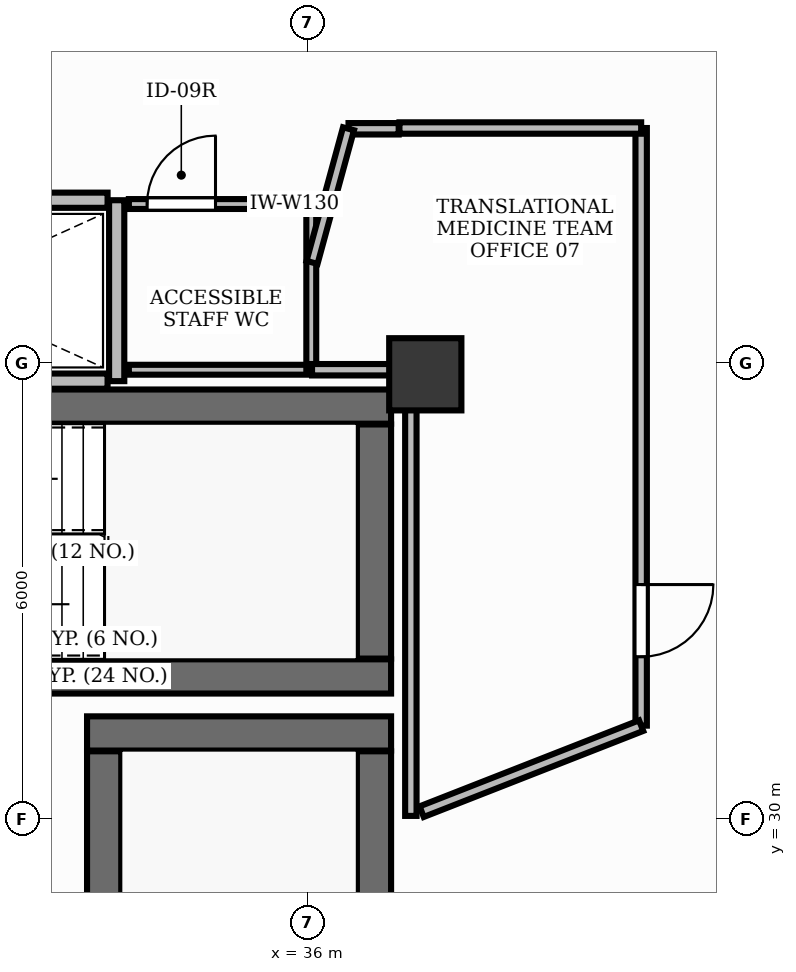
"""IFC4 building model, lengths in metres.
Left out: names, types, materials, properties, quantities, classifications, styles, units other than length and angle.
Written with IfcOpenShell. Run it as: python <this file> out.ifc"""

import sys

from ifc_helpers import new_model, si_unit, direction, frame, frame_2d, origin, origin_2d, place, context, subcontext, project, spatial, rectangle, extrude, element, fill, save


model = new_model("IFC4")
c1 = context("Model", 3, precision=1e-05, world=origin(), true_north=direction((0.0, 1.0)))
c2 = subcontext(c1, "Body", "Model", "MODEL_VIEW")
j1 = project(units=[si_unit("LENGTHUNIT", "METRE"), si_unit("PLANEANGLEUNIT", "RADIAN")], contexts=[c1])
p1 = place(None, origin())
s1 = spatial("IfcSite", under=j1, at=p1, CompositionType="ELEMENT")
p2 = place(p1, origin())
s2 = spatial("IfcBuilding", under=s1, at=p2, CompositionType="ELEMENT")
p3 = place(p2, frame((0.0, 0.0, 119.4)))
s3 = spatial("IfcBuildingStorey", under=s2, at=p3, CompositionType="ELEMENT", Elevation=119.4)
p4 = place(p3, frame((28.852, 35.425, 0.0), z_axis=(0.0, 0.0, 1.0), x_axis=(1.0, 0.0, 0.0)))
e1 = element("IfcWall", 1, at=p4, inside=s3, PredefinedType="SHEAR", context=c2, shape_type="SweptSolid", body=[
    extrude(rectangle(XDim=8.248, YDim=0.45, at=frame_2d((4.124, 0.0))), origin(), (0.0, 0.0, 1.0), 3.9),
])
p5 = place(p3, frame((28.35, 31.875, 0.0), z_axis=(0.0, 0.0, 1.0), x_axis=(1.0, 0.0, 0.0)))
e2 = element("IfcWall", 2, at=p5, inside=s3, PredefinedType="SHEAR", context=c2, shape_type="SweptSolid", body=[
    extrude(rectangle(XDim=8.75, YDim=0.45, at=frame_2d((4.375, 0.0))), origin(), (0.0, 0.0, 1.0), 3.9),
])
p6 = place(p3, frame((36.875, 32.11, 0.0), z_axis=(0.0, 0.0, 1.0), x_axis=(0.0, 1.0, 0.0)))
e3 = element("IfcWall", 3, at=p6, inside=s3, PredefinedType="SHEAR", context=c2, shape_type="SweptSolid", body=[
    extrude(rectangle(XDim=3.08, YDim=0.45, at=frame_2d((1.54, 0.0))), origin(), (0.0, 0.0, 1.0), 3.9),
])
p7 = place(p3, frame((33.1, 31.125, 0.0), z_axis=(0.0, 0.0, 1.0), x_axis=(1.0, 0.0, 0.0)))
e4 = element("IfcWall", 4, at=p7, inside=s3, PredefinedType="SHEAR", context=c2, shape_type="SweptSolid", body=[
    extrude(rectangle(XDim=4.0, YDim=0.45, at=frame_2d((2.0, 0.0))), origin(), (0.0, 0.0, 1.0), 3.9),
])
p8 = place(p3, frame((36.875, 23.11, 0.0), z_axis=(0.0, 0.0, 1.0), x_axis=(0.0, 1.0, 0.0)))
e5 = element("IfcWall", 5, at=p8, inside=s3, PredefinedType="SHEAR", context=c2, shape_type="SweptSolid", body=[
    extrude(rectangle(XDim=7.78, YDim=0.45, at=frame_2d((3.89, 0.0))), origin(), (0.0, 0.0, 1.0), 3.9),
])
p9 = place(p3, frame((33.325, 23.11, 0.0), z_axis=(0.0, 0.0, 1.0), x_axis=(0.0, 1.0, 0.0)))
e6 = element("IfcWall", 6, at=p9, inside=s3, PredefinedType="SHEAR", context=c2, shape_type="SweptSolid", body=[
    extrude(rectangle(XDim=7.78, YDim=0.45, at=frame_2d((3.89, 0.0))), origin(), (0.0, 0.0, 1.0), 3.9),
])
p10 = place(p9, frame((0.2, 0.0, 0.0)))
e7 = element("IfcOpeningElement", 7, at=p10, cuts=e6, PredefinedType="OPENING", context=c2, shape_type="SweptSolid", body=[
    extrude(rectangle(XDim=1.05, YDim=2.15, at=frame_2d((0.525, 1.075))), frame((0.0, 0.24, 0.0), z_axis=(0.0, -1.0, 0.0), x_axis=(1.0, 0.0, 0.0)), (0.0, 0.0, 1.0), 0.48),
])
p11 = place(p3, frame((37.55, 35.85, -0.0), z_axis=(0.0, 0.0, 1.0), x_axis=(1.0, 0.0, 0.0)))
e8 = element("IfcColumn", 8, at=p11, inside=s3, PredefinedType="PILASTER", context=c2, shape_type="SweptSolid", body=[
    extrude(rectangle(XDim=0.95, YDim=0.95, at=origin_2d()), origin(), (0.0, 0.0, 1.0), 3.901),
])
p12 = place(p3, frame((33.49, 35.76, 0.0), z_axis=(0.0, 0.0, 1.0), x_axis=(0.0, 1.0, 0.0)))
e9 = element("IfcWall", 9, at=p12, inside=s3, PredefinedType="PARTITIONING", context=c2, shape_type="SweptSolid", body=[
    extrude(rectangle(XDim=2.38, YDim=0.2, at=frame_2d((1.19, 0.0))), origin(), (0.0, 0.0, 1.0), 2.91),
])
for number, where, z_axis, x_axis in (
    (10, (28.8, 35.76, 0.0), (0.0, 0.0, 1.0), (1.0, 0.0, 0.0)),
    (11, (28.8, 38.14, 0.0), (0.0, 0.0, 1.0), (1.0, 0.0, 0.0)),
):
    element("IfcWall", number, at=place(p3, frame(where, z_axis=z_axis, x_axis=x_axis)), inside=s3, PredefinedType="PARTITIONING", context=c2, shape_type="SweptSolid", body=[
        extrude(rectangle(XDim=4.57, YDim=0.2, at=frame_2d((2.285, 0.0))), origin(), (0.0, 0.0, 1.0), 2.91),
    ])
p13 = place(p3, frame((33.65, 38.09, 0.0), z_axis=(0.0, 0.0, 1.0), x_axis=(1.0, 0.0, 0.0)))
e12 = element("IfcWall", 12, at=p13, inside=s3, PredefinedType="PARTITIONING", context=c2, shape_type="SweptSolid", body=[
    extrude(rectangle(XDim=2.4, YDim=0.13, at=frame_2d((1.2, 0.0))), origin(), (0.0, 0.0, 1.0), 2.91),
])
p14 = place(p13, frame((0.24, 0.0, 0.0)))
e13 = element("IfcOpeningElement", 13, at=p14, cuts=e12, PredefinedType="OPENING", context=c2, shape_type="SweptSolid", body=[
    extrude(rectangle(XDim=0.9, YDim=2.15, at=frame_2d((0.45, 1.075))), frame((0.0, 0.08, 0.0), z_axis=(0.0, -1.0, 0.0), x_axis=(1.0, 0.0, 0.0)), (0.0, 0.0, 1.0), 0.16),
])
p15 = place(p3, frame((40.39, 39.09, 0.0), z_axis=(0.0, 0.0, 1.0), x_axis=(0.0, -1.0, 0.0)))
e14 = element("IfcWall", 14, at=p15, inside=s3, PredefinedType="PARTITIONING", context=c2, shape_type="SweptSolid", body=[
    extrude(rectangle(XDim=7.862, YDim=0.15, at=frame_2d((3.931, 0.0))), origin(), (0.0, 0.0, 1.0), 2.91),
])
p16 = place(p15, frame((6.006, 0.0, 0.0)))
e15 = element("IfcOpeningElement", 15, at=p16, cuts=e14, PredefinedType="OPENING", context=c2, shape_type="SweptSolid", body=[
    extrude(rectangle(XDim=0.95, YDim=2.15, at=frame_2d((0.475, 1.075))), frame((0.0, 0.09, 0.0), z_axis=(0.0, -1.0, 0.0), x_axis=(1.0, 0.0, 0.0)), (0.0, 0.0, 1.0), 0.18),
])
p17 = place(p3, frame((36.05, 35.91, 0.0), z_axis=(0.0, 0.0, 1.0), x_axis=(-1.0, 0.0, 0.0)))
e16 = element("IfcWall", 16, at=p17, inside=s3, PredefinedType="PARTITIONING", context=c2, shape_type="SweptSolid", body=[
    extrude(rectangle(XDim=2.4, YDim=0.13, at=frame_2d((1.2, 0.0))), origin(), (0.0, 0.0, 1.0), 2.91),
])
p18 = place(p3, frame((36.05, 38.09, 0.0), z_axis=(0.0, 0.0, 1.0), x_axis=(0.0, -1.0, 0.0)))
e17 = element("IfcWall", 17, at=p18, inside=s3, PredefinedType="PARTITIONING", context=c2, shape_type="SweptSolid", body=[
    extrude(rectangle(XDim=2.18, YDim=0.13, at=frame_2d((1.09, 0.0))), origin(), (0.0, 0.0, 1.0), 2.91),
])
p19 = place(p3, frame((36.54, 39.08, 0.0), z_axis=(0.0, 0.0, 1.0), x_axis=(1.0, 0.0, 0.0)))
e18 = element("IfcWall", 18, at=p19, inside=s3, PredefinedType="PARTITIONING", context=c2, shape_type="SweptSolid", body=[
    extrude(rectangle(XDim=0.66, YDim=0.15, at=frame_2d((0.33, 0.0))), origin(), (0.0, 0.0, 1.0), 2.91),
])
p20 = place(p3, frame((37.21, 39.09, 0.0), z_axis=(0.0, 0.0, 1.0), x_axis=(1.0, 0.0, 0.0)))
e19 = element("IfcWall", 19, at=p20, inside=s3, PredefinedType="PARTITIONING", context=c2, shape_type="SweptSolid", body=[
    extrude(rectangle(XDim=3.18, YDim=0.15, at=frame_2d((1.59, 0.0))), origin(), (0.0, 0.0, 1.0), 2.91),
])
p21 = place(p3, frame((40.39, 31.228, 0.0), z_axis=(0.0, 0.0, 1.0), x_axis=(-0.931038232899, -0.364921647592, 0.0)))
e20 = element("IfcWall", 20, at=p21, inside=s3, PredefinedType="PARTITIONING", context=c2, shape_type="SweptSolid", body=[
    extrude(rectangle(XDim=3.102, YDim=0.15, at=frame_2d((1.551, 0.0))), origin(), (0.0, 0.0, 1.0), 2.91),
])
p22 = place(p3, frame((37.36, 30.04, 0.0), z_axis=(0.0, 0.0, 1.0), x_axis=(0.0, 1.0, 0.0)))
e21 = element("IfcWall", 21, at=p22, inside=s3, PredefinedType="PARTITIONING", context=c2, shape_type="SweptSolid", body=[
    extrude(rectangle(XDim=5.86, YDim=0.15, at=frame_2d((2.93, 0.0))), origin(), (0.0, 0.0, 1.0), 2.91),
])
p23 = place(p3, frame((37.35, 35.91, 0.0), z_axis=(0.0, 0.0, 1.0), x_axis=(-1.0, 0.0, 0.0)))
e22 = element("IfcWall", 22, at=p23, inside=s3, PredefinedType="PARTITIONING", context=c2, shape_type="SweptSolid", body=[
    extrude(rectangle(XDim=1.29, YDim=0.15, at=frame_2d((0.645, 0.0))), origin(), (0.0, 0.0, 1.0), 2.91),
])
p24 = place(p3, frame((36.06, 37.322, 0.0), z_axis=(0.0, 0.0, 1.0), x_axis=(0.263253435486, 0.964726711927, 0.0)))
e23 = element("IfcWall", 23, at=p24, inside=s3, PredefinedType="PARTITIONING", context=c2, shape_type="SweptSolid", body=[
    extrude(rectangle(XDim=1.822, YDim=0.15, at=frame_2d((0.911, 0.0))), origin(), (0.0, 0.0, 1.0), 2.91),
])
p25 = place(p14, origin())
e24 = element("IfcDoor", 24, at=p25, inside=s3, OperationType="SINGLE_SWING_RIGHT", PredefinedType="DOOR", context=c2, shape_type="SweptSolid", body=[
    extrude(rectangle(XDim=0.9, YDim=2.15, at=frame_2d((0.45, 1.075))), frame((0.0, 0.025, 0.0), z_axis=(0.0, -1.0, 0.0), x_axis=(1.0, 0.0, 0.0)), (0.0, 0.0, 1.0), 0.05),
])
fill(e13, e24)
p26 = place(p16, origin())
e25 = element("IfcDoor", 25, at=p26, inside=s3, OperationType="SINGLE_SWING_LEFT", PredefinedType="DOOR", context=c2, shape_type="SweptSolid", body=[
    extrude(rectangle(XDim=0.95, YDim=2.15, at=frame_2d((0.475, 1.075))), frame((0.0, 0.025, 0.0), z_axis=(0.0, -1.0, 0.0), x_axis=(1.0, 0.0, 0.0)), (0.0, 0.0, 1.0), 0.05),
])
fill(e15, e25)
save(model, sys.argv[1])
